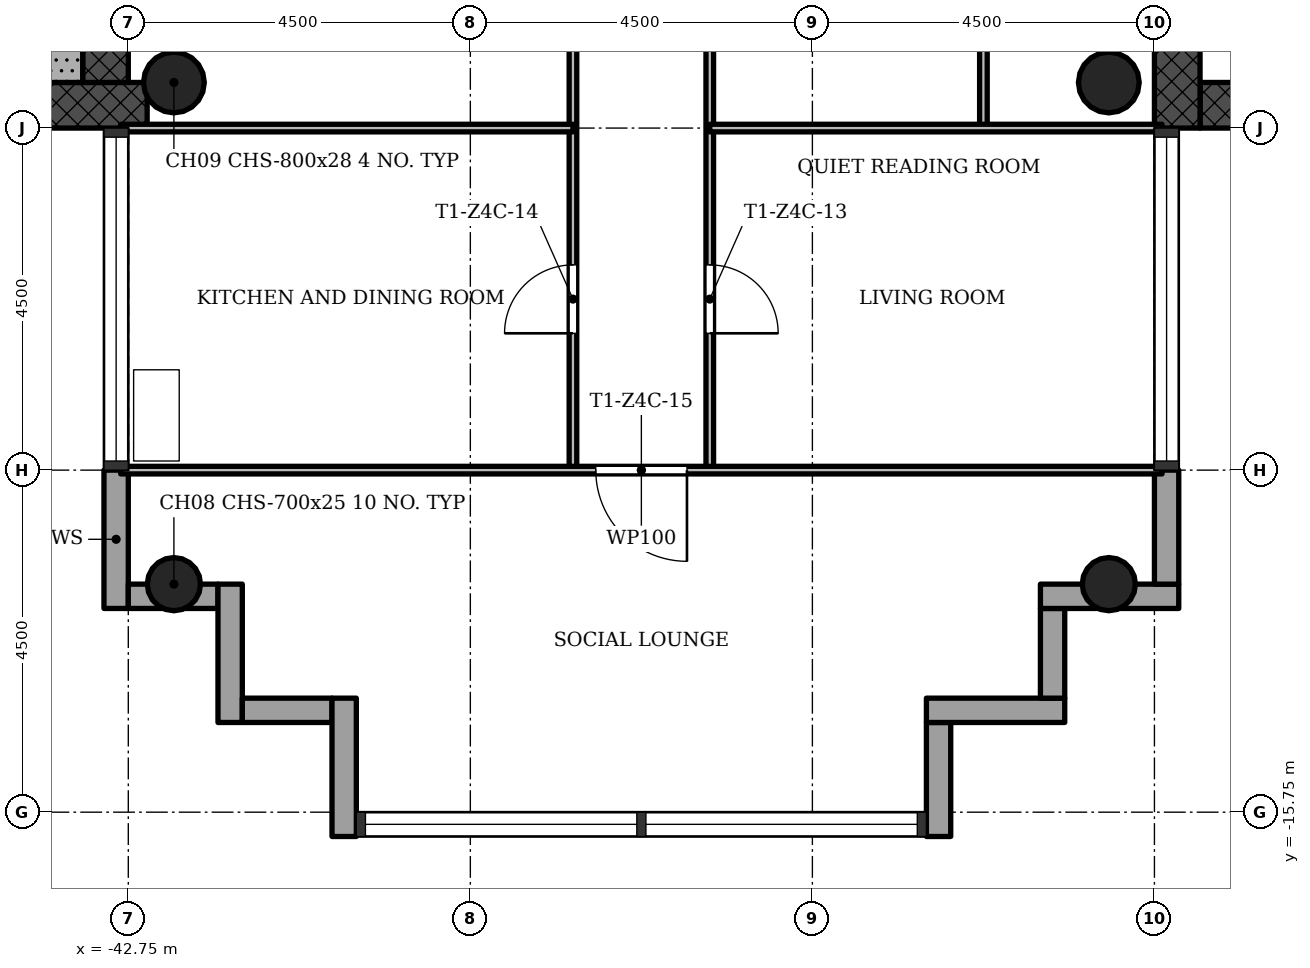
"""IFC4 building model, lengths in metres.
Left out: names, types, materials, properties, quantities, classifications, styles, units other than length and angle.
Written with IfcOpenShell. Run it as: python <this file> out.ifc"""

import sys

from ifc_helpers import new_model, si_unit, direction, frame, frame_2d, origin, origin_2d, place, context, subcontext, project, spatial, rectangle, hollow_circle, extrude, element, fill, save


model = new_model("IFC4")
c1 = context("Model", 3, precision=1e-05, world=origin(), true_north=direction((0.0, 1.0)))
c2 = subcontext(c1, "Body", "Model", "MODEL_VIEW")
j1 = project(units=[si_unit("LENGTHUNIT", "METRE"), si_unit("PLANEANGLEUNIT", "RADIAN")], contexts=[c1])
p1 = place(None, origin())
s1 = spatial("IfcSite", under=j1, at=p1, CompositionType="ELEMENT")
p2 = place(p1, origin())
s2 = spatial("IfcBuilding", under=s1, at=p2, CompositionType="ELEMENT")
p3 = place(p2, frame((0.0, 0.0, 189.2)))
s3 = spatial("IfcBuildingStorey", under=s2, at=p3, CompositionType="ELEMENT", Elevation=189.2)
p4 = place(p3, frame((-28.65, -6.45, 0.0), z_axis=(0.0, 0.0, 1.0), x_axis=(1.0, 0.0, 0.0)))
e1 = element("IfcWall", 1, at=p4, inside=s3, PredefinedType="SHEAR", context=c2, shape_type="SweptSolid", body=[
    extrude(rectangle(XDim=8.4, YDim=0.6, at=frame_2d((4.2, 0.0))), origin(), (0.0, 0.0, 1.0), 3.4),
])
p5 = place(p3, frame((-28.95, 6.15, 0.0), z_axis=(0.0, 0.0, 1.0), x_axis=(0.0, -1.0, 0.0)))
e2 = element("IfcWall", 2, at=p5, inside=s3, PredefinedType="SHEAR", context=c2, shape_type="SweptSolid", body=[
    extrude(rectangle(XDim=12.9, YDim=0.6, at=frame_2d((6.45, 0.0))), origin(), (0.0, 0.0, 1.0), 3.4),
])
p6 = place(p5, frame((5.25, 0.0, 0.0)))
e3 = element("IfcOpeningElement", 3, at=p6, cuts=e2, PredefinedType="OPENING", context=c2, shape_type="SweptSolid", body=[
    extrude(rectangle(XDim=1.8, YDim=2.1, at=frame_2d((0.9, 1.05))), frame((0.0, 0.31, 0.0), z_axis=(0.0, -1.0, 0.0), x_axis=(1.0, 0.0, 0.0)), (0.0, 0.0, 1.0), 0.62),
])
p7 = place(p3, frame((-51.15, -6.45, 0.0), z_axis=(0.0, 0.0, 1.0), x_axis=(1.0, 0.0, 0.0)))
e4 = element("IfcWall", 4, at=p7, inside=s3, PredefinedType="SHEAR", context=c2, shape_type="SweptSolid", body=[
    extrude(rectangle(XDim=8.648, YDim=0.6, at=frame_2d((4.324, 0.0))), origin(), (0.0, 0.0, 1.0), 3.4),
])
p8 = place(p3, frame((-43.05, -6.15, 0.0), z_axis=(0.0, 0.0, 1.0), x_axis=(0.0, 1.0, 0.0)))
e5 = element("IfcWall", 5, at=p8, inside=s3, PredefinedType="SHEAR", context=c2, shape_type="SweptSolid", body=[
    extrude(rectangle(XDim=12.9, YDim=0.6, at=frame_2d((6.45, 0.0))), origin(), (0.0, 0.0, 1.0), 3.4),
])
p9 = place(p8, frame((5.25, 0.0, 0.0)))
e6 = element("IfcOpeningElement", 6, at=p9, cuts=e5, PredefinedType="OPENING", context=c2, shape_type="SweptSolid", body=[
    extrude(rectangle(XDim=1.8, YDim=2.1, at=frame_2d((0.9, 1.05))), frame((0.0, 0.31, 0.0), z_axis=(0.0, -1.0, 0.0), x_axis=(1.0, 0.0, 0.0)), (0.0, 0.0, 1.0), 0.62),
])
for number, where, z_axis, x_axis in (
    (7, (-42.15, -12.75, 0.0), (0.0, 0.0, 1.0), (1.0, 0.0, 0.0)),
    (8, (-29.85, -12.75, 0.0), (0.0, 0.0, 1.0), (1.0, 0.0, 0.0)),
):
    element("IfcColumn", number, at=place(p3, frame(where, z_axis=z_axis, x_axis=x_axis)), inside=s3, PredefinedType="COLUMN", context=c2, shape_type="SweptSolid", body=[
        extrude(hollow_circle(Radius=0.35, WallThickness=0.025, at=origin_2d()), origin(), (0.0, 0.0, 1.0), 3.4),
    ])
for number, where, z_axis, x_axis in (
    (9, (-42.15, -6.15, 0.0), (0.0, 0.0, 1.0), (1.0, 0.0, 0.0)),
    (10, (-29.85, -6.15, 0.0), (0.0, 0.0, 1.0), (1.0, 0.0, 0.0)),
):
    element("IfcColumn", number, at=place(p3, frame(where, z_axis=z_axis, x_axis=x_axis)), inside=s3, PredefinedType="COLUMN", context=c2, shape_type="SweptSolid", body=[
        extrude(hollow_circle(Radius=0.4, WallThickness=0.028, at=origin_2d()), origin(), (0.0, 0.0, 1.0), 3.4),
    ])
p10 = place(p3, frame((-42.91, -11.25, -0.3), z_axis=(0.0, 0.0, 1.0), x_axis=(0.0, -1.0, 0.0)))
e11 = element("IfcWall", 11, at=p10, inside=s3, PredefinedType="STANDARD", context=c2, shape_type="SweptSolid", body=[
    extrude(rectangle(XDim=1.82, YDim=0.32, at=frame_2d((0.91, 0.0))), origin(), (0.0, 0.0, 1.0), 3.4),
])
p11 = place(p3, frame((-42.75, -12.91, -0.3), z_axis=(0.0, 0.0, 1.0), x_axis=(1.0, 0.0, 0.0)))
e12 = element("IfcWall", 12, at=p11, inside=s3, PredefinedType="STANDARD", context=c2, shape_type="SweptSolid", body=[
    extrude(rectangle(XDim=1.18, YDim=0.32, at=frame_2d((0.59, 0.0))), origin(), (0.0, 0.0, 1.0), 3.4),
])
p12 = place(p3, frame((-41.41, -12.75, -0.3), z_axis=(0.0, 0.0, 1.0), x_axis=(0.0, -1.0, 0.0)))
e13 = element("IfcWall", 13, at=p12, inside=s3, PredefinedType="STANDARD", context=c2, shape_type="SweptSolid", body=[
    extrude(rectangle(XDim=1.82, YDim=0.32, at=frame_2d((0.91, 0.0))), origin(), (0.0, 0.0, 1.0), 3.4),
])
p13 = place(p3, frame((-41.25, -14.41, -0.3), z_axis=(0.0, 0.0, 1.0), x_axis=(1.0, 0.0, 0.0)))
e14 = element("IfcWall", 14, at=p13, inside=s3, PredefinedType="STANDARD", context=c2, shape_type="SweptSolid", body=[
    extrude(rectangle(XDim=1.18, YDim=0.32, at=frame_2d((0.59, 0.0))), origin(), (0.0, 0.0, 1.0), 3.4),
])
p14 = place(p3, frame((-39.91, -14.25, -0.3), z_axis=(0.0, 0.0, 1.0), x_axis=(0.0, -1.0, 0.0)))
e15 = element("IfcWall", 15, at=p14, inside=s3, PredefinedType="STANDARD", context=c2, shape_type="SweptSolid", body=[
    extrude(rectangle(XDim=1.82, YDim=0.32, at=frame_2d((0.91, 0.0))), origin(), (0.0, 0.0, 1.0), 3.4),
])
p15 = place(p3, frame((-32.09, -16.07, -0.3), z_axis=(0.0, 0.0, 1.0), x_axis=(0.0, 1.0, 0.0)))
e16 = element("IfcWall", 16, at=p15, inside=s3, PredefinedType="STANDARD", context=c2, shape_type="SweptSolid", body=[
    extrude(rectangle(XDim=1.5, YDim=0.32, at=frame_2d((0.75, 0.0))), origin(), (0.0, 0.0, 1.0), 3.4),
])
p16 = place(p3, frame((-32.25, -14.41, -0.3), z_axis=(0.0, 0.0, 1.0), x_axis=(1.0, 0.0, 0.0)))
e17 = element("IfcWall", 17, at=p16, inside=s3, PredefinedType="STANDARD", context=c2, shape_type="SweptSolid", body=[
    extrude(rectangle(XDim=1.82, YDim=0.32, at=frame_2d((0.91, 0.0))), origin(), (0.0, 0.0, 1.0), 3.4),
])
p17 = place(p3, frame((-30.59, -14.25, -0.3), z_axis=(0.0, 0.0, 1.0), x_axis=(0.0, 1.0, 0.0)))
e18 = element("IfcWall", 18, at=p17, inside=s3, PredefinedType="STANDARD", context=c2, shape_type="SweptSolid", body=[
    extrude(rectangle(XDim=1.18, YDim=0.32, at=frame_2d((0.59, 0.0))), origin(), (0.0, 0.0, 1.0), 3.4),
])
p18 = place(p3, frame((-30.75, -12.91, -0.3), z_axis=(0.0, 0.0, 1.0), x_axis=(1.0, 0.0, 0.0)))
e19 = element("IfcWall", 19, at=p18, inside=s3, PredefinedType="STANDARD", context=c2, shape_type="SweptSolid", body=[
    extrude(rectangle(XDim=1.82, YDim=0.32, at=frame_2d((0.91, 0.0))), origin(), (0.0, 0.0, 1.0), 3.4),
])
p19 = place(p3, frame((-29.09, -12.75, -0.3), z_axis=(0.0, 0.0, 1.0), x_axis=(0.0, 1.0, 0.0)))
e20 = element("IfcWall", 20, at=p19, inside=s3, PredefinedType="STANDARD", context=c2, shape_type="SweptSolid", body=[
    extrude(rectangle(XDim=1.5, YDim=0.32, at=frame_2d((0.75, 0.0))), origin(), (0.0, 0.0, 1.0), 3.4),
])
p20 = place(p3, frame((-36.9, -11.25, 0.0), z_axis=(0.0, 0.0, 1.0), x_axis=(0.0, 1.0, 0.0)))
e21 = element("IfcWall", 21, at=p20, inside=s3, PredefinedType="PARTITIONING", context=c2, shape_type="SweptSolid", body=[
    extrude(rectangle(XDim=6.75, YDim=0.1, at=frame_2d((3.375, 0.0))), origin(), (0.0, 0.0, 1.0), 3.0),
])
p21 = place(p20, frame((1.8, 0.0, 0.0)))
e22 = element("IfcOpeningElement", 22, at=p21, cuts=e21, PredefinedType="OPENING", context=c2, shape_type="SweptSolid", body=[
    extrude(rectangle(XDim=0.9, YDim=2.1, at=frame_2d((0.45, 1.05))), frame((0.0, 0.06, 0.0), z_axis=(0.0, -1.0, 0.0), x_axis=(1.0, 0.0, 0.0)), (0.0, 0.0, 1.0), 0.12),
])
p22 = place(p3, frame((-35.1, -11.25, 0.0), z_axis=(0.0, 0.0, 1.0), x_axis=(0.0, 1.0, 0.0)))
e23 = element("IfcWall", 23, at=p22, inside=s3, PredefinedType="PARTITIONING", context=c2, shape_type="SweptSolid", body=[
    extrude(rectangle(XDim=6.75, YDim=0.1, at=frame_2d((3.375, 0.0))), origin(), (0.0, 0.0, 1.0), 3.0),
])
p23 = place(p22, frame((1.8, 0.0, 0.0)))
e24 = element("IfcOpeningElement", 24, at=p23, cuts=e23, PredefinedType="OPENING", context=c2, shape_type="SweptSolid", body=[
    extrude(rectangle(XDim=0.9, YDim=2.1, at=frame_2d((0.45, 1.05))), frame((0.0, 0.06, 0.0), z_axis=(0.0, -1.0, 0.0), x_axis=(1.0, 0.0, 0.0)), (0.0, 0.0, 1.0), 0.12),
])
p24 = place(p3, frame((-31.5, -6.75, 0.0), z_axis=(0.0, 0.0, 1.0), x_axis=(0.0, 1.0, 0.0)))
e25 = element("IfcWall", 25, at=p24, inside=s3, PredefinedType="PARTITIONING", context=c2, shape_type="SweptSolid", body=[
    extrude(rectangle(XDim=5.25, YDim=0.1, at=frame_2d((2.625, 0.0))), origin(), (0.0, 0.0, 1.0), 3.0),
])
p25 = place(p24, frame((3.3, 0.0, 0.0)))
e26 = element("IfcOpeningElement", 26, at=p25, cuts=e25, PredefinedType="OPENING", context=c2, shape_type="SweptSolid", body=[
    extrude(rectangle(XDim=0.9, YDim=2.1, at=frame_2d((0.45, 1.05))), frame((0.0, 0.06, 0.0), z_axis=(0.0, -1.0, 0.0), x_axis=(1.0, 0.0, 0.0)), (0.0, 0.0, 1.0), 0.12),
])
p26 = place(p3, frame((-42.85, -11.25, 0.0), z_axis=(0.0, 0.0, 1.0), x_axis=(1.0, 0.0, 0.0)))
e27 = element("IfcWall", 27, at=p26, inside=s3, PredefinedType="PARTITIONING", context=c2, shape_type="SweptSolid", body=[
    extrude(rectangle(XDim=13.7, YDim=0.1, at=frame_2d((6.85, 0.0))), origin(), (0.0, 0.0, 1.0), 3.0),
])
p27 = place(p26, frame((6.25, 0.0, 0.0)))
e28 = element("IfcOpeningElement", 28, at=p27, cuts=e27, PredefinedType="OPENING", context=c2, shape_type="SweptSolid", body=[
    extrude(rectangle(XDim=1.2, YDim=2.1, at=frame_2d((0.6, 1.05))), frame((0.0, 0.06, 0.0), z_axis=(0.0, -1.0, 0.0), x_axis=(1.0, 0.0, 0.0)), (0.0, 0.0, 1.0), 0.12),
])
for number, where, z_axis, x_axis in (
    (29, (-42.85, -6.75, 0.0), (0.0, 0.0, 1.0), (1.0, 0.0, 0.0)),
    (30, (-35.1, -6.75, 0.0), (0.0, 0.0, 1.0), (1.0, 0.0, 0.0)),
):
    element("IfcWall", number, at=place(p3, frame(where, z_axis=z_axis, x_axis=x_axis)), inside=s3, PredefinedType="PARTITIONING", context=c2, shape_type="SweptSolid", body=[
        extrude(rectangle(XDim=5.95, YDim=0.1, at=frame_2d((2.975, 0.0))), origin(), (0.0, 0.0, 1.0), 3.0),
    ])
p28 = place(p3, frame((-43.65, -1.85, 0.0), z_axis=(0.0, 0.0, 1.0), x_axis=(0.0, -1.0, 0.0)))
e31 = element("IfcWall", 31, at=p28, inside=s3, PredefinedType="SHEAR", context=c2, shape_type="SweptSolid", body=[
    extrude(rectangle(XDim=4.3, YDim=0.6, at=frame_2d((2.15, 0.0))), origin(), (0.0, 0.0, 1.0), 3.4),
])
p29 = place(p23, origin())
e32 = element("IfcDoor", 32, at=p29, inside=s3, OperationType="SINGLE_SWING_LEFT", PredefinedType="DOOR", context=c2, shape_type="SweptSolid", body=[
    extrude(rectangle(XDim=0.9, YDim=2.1, at=frame_2d((0.45, 1.05))), frame((0.0, 0.025, 0.0), z_axis=(0.0, -1.0, 0.0), x_axis=(1.0, 0.0, 0.0)), (0.0, 0.0, 1.0), 0.05),
])
fill(e24, e32)
p30 = place(p21, origin())
e33 = element("IfcDoor", 33, at=p30, inside=s3, OperationType="SINGLE_SWING_RIGHT", PredefinedType="DOOR", context=c2, shape_type="SweptSolid", body=[
    extrude(rectangle(XDim=0.9, YDim=2.1, at=frame_2d((0.45, 1.05))), frame((0.0, 0.025, 0.0), z_axis=(0.0, -1.0, 0.0), x_axis=(1.0, 0.0, 0.0)), (0.0, 0.0, 1.0), 0.05),
])
fill(e22, e33)
p31 = place(p27, origin())
e34 = element("IfcDoor", 34, at=p31, inside=s3, OperationType="SINGLE_SWING_RIGHT", PredefinedType="DOOR", context=c2, shape_type="SweptSolid", body=[
    extrude(rectangle(XDim=1.2, YDim=2.1, at=frame_2d((0.6, 1.05))), frame((0.0, 0.025, 0.0), z_axis=(0.0, -1.0, 0.0), x_axis=(1.0, 0.0, 0.0)), (0.0, 0.0, 1.0), 0.05),
])
fill(e28, e34)
save(model, sys.argv[1])
